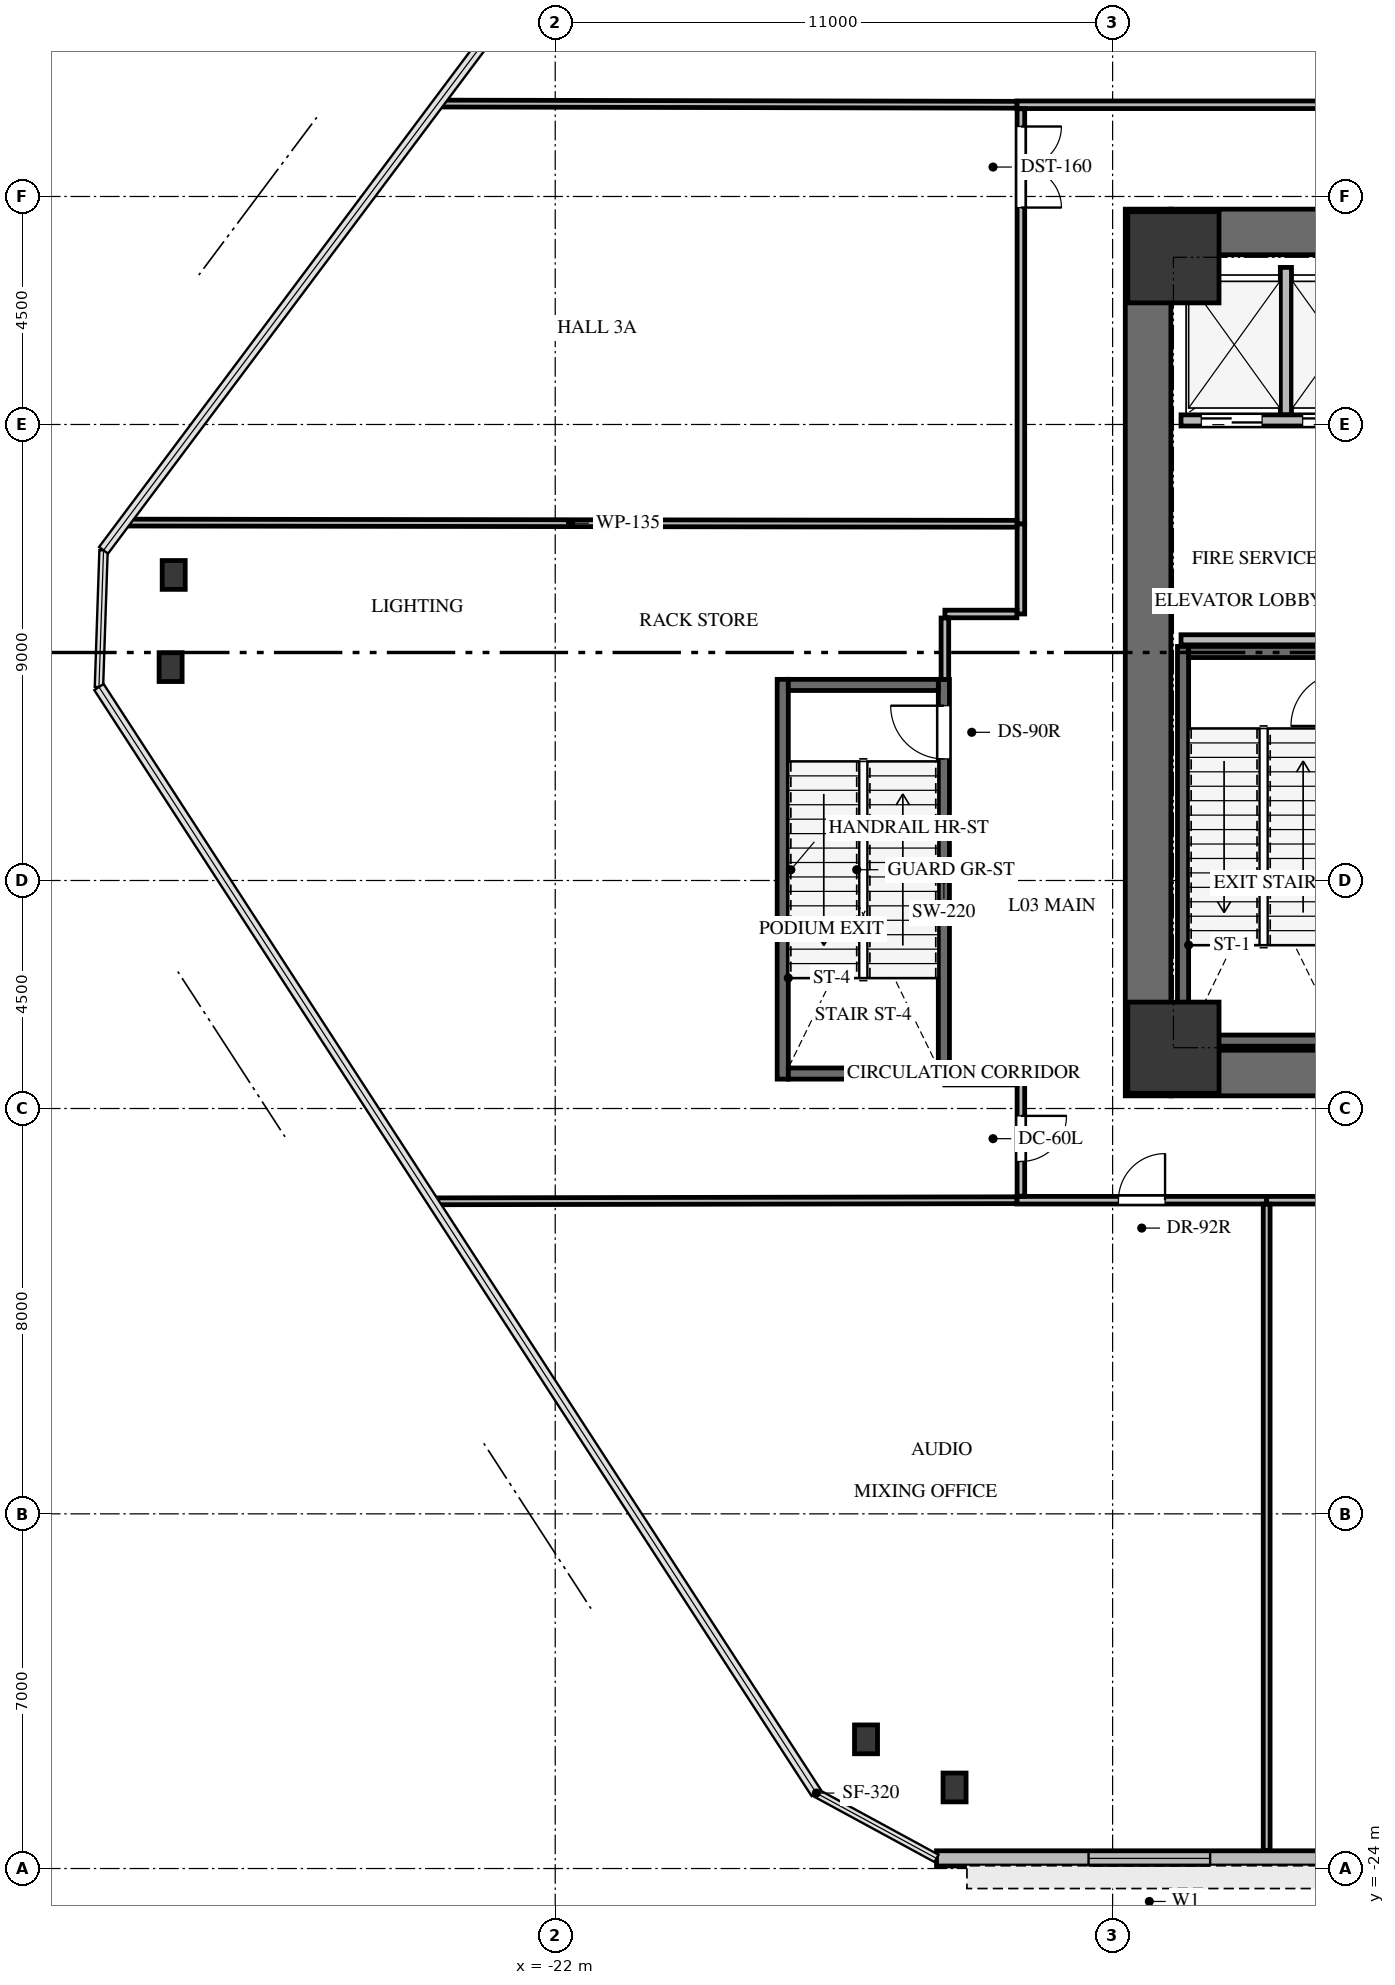
"""IFC4 building model, lengths in metres.
Left out: names, types, materials, properties, quantities, classifications, styles, units other than length and angle.
Written with IfcOpenShell. Run it as: python <this file> out.ifc"""

import sys

from ifc_helpers import new_model, si_unit, direction, frame, frame_2d, origin, origin_2d, place, context, subcontext, project, spatial, rectangle, i_section, extrude, source, transform, mapped, element, fill, save


model = new_model("IFC4")
c1 = context("Model", 3, precision=1e-05, world=origin(), true_north=direction((0.0, 1.0)))
c2 = subcontext(c1, "Body", "Model", "MODEL_VIEW")
j1 = project(units=[si_unit("LENGTHUNIT", "METRE"), si_unit("PLANEANGLEUNIT", "RADIAN")], contexts=[c1])
p1 = place(None, origin())
s1 = spatial("IfcSite", under=j1, at=p1, CompositionType="ELEMENT")
p2 = place(p1, origin())
s2 = spatial("IfcBuilding", under=s1, at=p2, CompositionType="ELEMENT")
p3 = place(p2, frame((0.0, 0.0, 15.6)))
s3 = spatial("IfcBuildingStorey", under=s2, at=p3, CompositionType="ELEMENT", Elevation=15.6)
p4 = place(p3, frame((-10.3, -8.75, 0.0), z_axis=(0.0, 0.0, 1.0), x_axis=(0.0, 1.0, 0.0)))
e1 = element("IfcWall", 1, at=p4, inside=s3, PredefinedType="SHEAR", context=c2, shape_type="SweptSolid", body=[
    extrude(rectangle(XDim=17.5, YDim=0.9, at=frame_2d((8.75, 0.0))), origin(), (0.0, 0.0, 1.0), 5.6),
])
p5 = place(p3, frame((-9.85, -8.3, 0.0), z_axis=(0.0, 0.0, 1.0), x_axis=(1.0, 0.0, 0.0)))
e2 = element("IfcWall", 2, at=p5, inside=s3, PredefinedType="SHEAR", context=c2, shape_type="SweptSolid", body=[
    extrude(rectangle(XDim=7.75, YDim=0.9, at=frame_2d((3.875, 0.0))), origin(), (0.0, 0.0, 1.0), 5.6),
])
p6 = place(p3, frame((-9.85, 8.3, 0.0), z_axis=(0.0, 0.0, 1.0), x_axis=(1.0, 0.0, 0.0)))
e3 = element("IfcWall", 3, at=p6, inside=s3, PredefinedType="SHEAR", context=c2, shape_type="SweptSolid", body=[
    extrude(rectangle(XDim=19.7, YDim=0.9, at=frame_2d((9.85, 0.0))), origin(), (0.0, 0.0, 1.0), 5.6),
])
p7 = place(p3, frame((-9.61, 0.12, -0.32), z_axis=(0.0, 0.0, 1.0), x_axis=(0.0, -1.0, 0.0)))
e4 = element("IfcWall", 4, at=p7, inside=s3, PredefinedType="SHEAR", context=c2, shape_type="SweptSolid", body=[
    extrude(rectangle(XDim=7.89, YDim=0.22, at=frame_2d((3.945, 0.0))), origin(), (0.0, 0.0, 1.0), 5.6),
])
for number, where, z_axis, x_axis in (
    (5, (-9.5, -7.66, -0.32), (0.0, 0.0, 1.0), (1.0, 0.0, 0.0)),
    (6, (-6.54, 0.01, -0.32), (0.0, 0.0, 1.0), (-1.0, 0.0, 0.0)),
):
    element("IfcWall", number, at=place(p3, frame(where, z_axis=z_axis, x_axis=x_axis)), inside=s3, PredefinedType="SHEAR", context=c2, shape_type="SweptSolid", body=[
        extrude(rectangle(XDim=2.96, YDim=0.22, at=frame_2d((1.48, 0.0))), origin(), (0.0, 0.0, 1.0), 5.6),
    ])
p8 = place(p3, frame((-14.33, -8.42, -0.32), z_axis=(0.0, 0.0, 1.0), x_axis=(0.0, 1.0, 0.0)))
e7 = element("IfcWall", 7, at=p8, inside=s3, PredefinedType="SHEAR", context=c2, shape_type="SweptSolid", body=[
    extrude(rectangle(XDim=7.89, YDim=0.22, at=frame_2d((3.945, 0.0))), origin(), (0.0, 0.0, 1.0), 5.6),
])
p9 = place(p8, frame((6.32, 0.0, 0.0)))
e8 = element("IfcOpeningElement", 8, at=p9, cuts=e7, PredefinedType="OPENING", context=c2, shape_type="SweptSolid", body=[
    extrude(rectangle(XDim=1.05, YDim=2.15, at=frame_2d((0.525, 1.075))), frame((0.0, 0.12, 0.0), z_axis=(0.0, -1.0, 0.0), x_axis=(1.0, 0.0, 0.0)), (0.0, 0.0, 1.0), 0.24),
])
p10 = place(p3, frame((-17.51, -0.53, -0.32), z_axis=(0.0, 0.0, 1.0), x_axis=(0.0, -1.0, 0.0)))
e9 = element("IfcWall", 9, at=p10, inside=s3, PredefinedType="SHEAR", context=c2, shape_type="SweptSolid", body=[
    extrude(rectangle(XDim=7.89, YDim=0.22, at=frame_2d((3.945, 0.0))), origin(), (0.0, 0.0, 1.0), 5.6),
])
for number, where, z_axis, x_axis in (
    (10, (-17.4, -8.31, -0.32), (0.0, 0.0, 1.0), (1.0, 0.0, 0.0)),
    (11, (-14.44, -0.64, -0.32), (0.0, 0.0, 1.0), (-1.0, 0.0, 0.0)),
):
    element("IfcWall", number, at=place(p3, frame(where, z_axis=z_axis, x_axis=x_axis)), inside=s3, PredefinedType="SHEAR", context=c2, shape_type="SweptSolid", body=[
        extrude(rectangle(XDim=2.96, YDim=0.22, at=frame_2d((1.48, 0.0))), origin(), (0.0, 0.0, 1.0), 5.6),
    ])
m1 = source(origin(), c2, "Body", "SweptSolid", [
    extrude(rectangle(XDim=1.8, YDim=1.8, at=origin_2d()), origin(), (0.0, 0.0, 1.0), 5.6),
])
for number, where, z_axis, x_axis in (
    (12, (-9.8, -7.8, -0.32), (0.0, 0.0, 1.0), (1.0, 0.0, 0.0)),
    (13, (-9.8, 7.8, -0.32), (0.0, 0.0, 1.0), (1.0, 0.0, 0.0)),
):
    element("IfcColumn", number, at=place(p3, frame(where, z_axis=z_axis, x_axis=x_axis)), inside=s3, PredefinedType="COLUMN", context=c2, shape_type="MappedRepresentation", body=[
        mapped(m1, transform((0.0, 0.0, 0.0), x_axis=(1.0, 0.0, 0.0), y_axis=(0.0, 1.0, 0.0), z_axis=(0.0, 0.0, 1.0), scale=1.0)),
    ])
m2 = source(origin(), c2, "Body", "SweptSolid", [
    extrude(i_section(OverallWidth=0.454, OverallDepth=0.569, WebThickness=0.078, FlangeThickness=0.125, FilletRadius=0.031, at=origin_2d()), origin(), (0.0, 0.0, 1.0), 5.6),
])
for number, where, z_axis, x_axis in (
    (14, (-15.866, -21.451, -0.32), (0.0, 0.0, 1.0), (1.0, 0.0, 0.0)),
    (15, (-29.591, -0.289, -0.32), (0.0, 0.0, 1.0), (1.0, 0.0, 0.0)),
    (16, (-29.529, 1.531, -0.32), (0.0, 0.0, 1.0), (1.0, 0.0, 0.0)),
    (17, (-14.119, -22.4, -0.32), (0.0, 0.0, 1.0), (1.0, 0.0, 0.0)),
):
    element("IfcColumn", number, at=place(p3, frame(where, z_axis=z_axis, x_axis=x_axis)), inside=s3, PredefinedType="COLUMN", context=c2, shape_type="MappedRepresentation", body=[
        mapped(m2, transform((0.0, 0.0, 0.0), x_axis=(1.0, 0.0, 0.0), y_axis=(0.0, 1.0, 0.0), z_axis=(0.0, 0.0, 1.0), scale=1.0)),
    ])
p11 = place(p3, frame((13.103, -23.8, 0.0), z_axis=(0.0, 0.0, 1.0), x_axis=(-1.0, 0.0, 0.0)))
e18 = element("IfcWall", 18, at=p11, inside=s3, PredefinedType="SOLIDWALL", context=c2, shape_type="SweptSolid", body=[
    extrude(rectangle(XDim=27.578, YDim=0.3, at=frame_2d((13.789, 0.0))), origin(), (0.0, 0.0, 1.0), 5.28),
])
p12 = place(p11, frame((3.0, 0.0, 1.0)))
e19 = element("IfcOpeningElement", 19, at=p12, cuts=e18, PredefinedType="OPENING", context=c2, shape_type="SweptSolid", body=[
    extrude(rectangle(XDim=2.4, YDim=2.1, at=frame_2d((1.2, 1.05))), frame((0.0, 0.16, 0.0), z_axis=(0.0, -1.0, 0.0), x_axis=(1.0, 0.0, 0.0)), (0.0, 0.0, 1.0), 0.32),
])
p13 = place(p11, frame((22.178, 0.0, 1.0)))
e20 = element("IfcOpeningElement", 20, at=p13, cuts=e18, PredefinedType="OPENING", context=c2, shape_type="SweptSolid", body=[
    extrude(rectangle(XDim=2.4, YDim=2.1, at=frame_2d((1.2, 1.05))), frame((0.0, 0.16, 0.0), z_axis=(0.0, -1.0, 0.0), x_axis=(1.0, 0.0, 0.0)), (0.0, 0.0, 1.0), 0.32),
])
p14 = place(p3, frame((-9.65, 4.58, 0.0), z_axis=(0.0, 0.0, 1.0), x_axis=(1.0, 0.0, 0.0)))
e21 = element("IfcWall", 21, at=p14, inside=s3, PredefinedType="SOLIDWALL", context=c2, shape_type="SweptSolid", body=[
    extrude(rectangle(XDim=4.175, YDim=0.22, at=frame_2d((2.087, 0.0))), origin(), (0.0, 0.0, 1.0), 5.265),
])
p15 = place(p14, frame((0.4, 0.0, 0.0)))
e22 = element("IfcOpeningElement", 22, at=p15, cuts=e21, PredefinedType="OPENING", context=c2, shape_type="SweptSolid", body=[
    extrude(rectangle(XDim=1.2, YDim=2.15, at=frame_2d((0.6, 1.075))), frame((0.0, 0.12, 0.0), z_axis=(0.0, -1.0, 0.0), x_axis=(1.0, 0.0, 0.0)), (0.0, 0.0, 1.0), 0.24),
])
p16 = place(p14, frame((2.4, 0.0, 0.0)))
e23 = element("IfcOpeningElement", 23, at=p16, cuts=e21, PredefinedType="OPENING", context=c2, shape_type="SweptSolid", body=[
    extrude(rectangle(XDim=1.2, YDim=2.15, at=frame_2d((0.6, 1.075))), frame((0.0, 0.12, 0.0), z_axis=(0.0, -1.0, 0.0), x_axis=(1.0, 0.0, 0.0)), (0.0, 0.0, 1.0), 0.24),
])
p17 = place(p3, frame((-7.58, 4.694, 0.0), z_axis=(0.0, 0.0, 1.0), x_axis=(0.0, 1.0, 0.0)))
e24 = element("IfcWall", 24, at=p17, inside=s3, PredefinedType="SOLIDWALL", context=c2, shape_type="SweptSolid", body=[
    extrude(rectangle(XDim=2.906, YDim=0.22, at=frame_2d((1.453, 0.0))), origin(), (0.0, 0.0, 1.0), 5.265),
])
p18 = place(p3, frame((-9.65, 0.25, 0.0), z_axis=(0.0, 0.0, 1.0), x_axis=(1.0, 0.0, 0.0)))
e25 = element("IfcWall", 25, at=p18, inside=s3, PredefinedType="SOLIDWALL", context=c2, shape_type="SweptSolid", body=[
    extrude(rectangle(XDim=4.27, YDim=0.2, at=frame_2d((2.135, 0.0))), origin(), (0.0, 0.0, 1.0), 5.265),
])
p19 = place(p3, frame((-3.96, 10.81, 0.0), z_axis=(0.0, 0.0, 1.0), x_axis=(-1.0, 0.0, 0.0)))
e26 = element("IfcWall", 26, at=p19, inside=s3, PredefinedType="PARTITIONING", context=c2, shape_type="SweptSolid", body=[
    extrude(rectangle(XDim=8.93, YDim=0.15, at=frame_2d((4.465, 0.0))), origin(), (0.0, 0.0, 1.0), 4.284),
])
p20 = place(p19, frame((0.35, 0.0, 0.0)))
e27 = element("IfcOpeningElement", 27, at=p20, cuts=e26, PredefinedType="OPENING", context=c2, shape_type="SweptSolid", body=[
    extrude(rectangle(XDim=1.6, YDim=2.15, at=frame_2d((0.8, 1.075))), frame((0.0, 0.085, 0.0), z_axis=(0.0, -1.0, 0.0), x_axis=(1.0, 0.0, 0.0)), (0.0, 0.0, 1.0), 0.17),
])
p21 = place(p3, frame((-12.89, -10.81, 0.0), z_axis=(0.0, 0.0, 1.0), x_axis=(1.0, 0.0, 0.0)))
e28 = element("IfcWall", 28, at=p21, inside=s3, PredefinedType="PARTITIONING", context=c2, shape_type="SweptSolid", body=[
    extrude(rectangle(XDim=4.93, YDim=0.15, at=frame_2d((2.465, 0.0))), origin(), (0.0, 0.0, 1.0), 4.284),
])
p22 = place(p21, frame((2.005, 0.0, 0.0)))
e29 = element("IfcOpeningElement", 29, at=p22, cuts=e28, PredefinedType="OPENING", context=c2, shape_type="SweptSolid", body=[
    extrude(rectangle(XDim=0.92, YDim=2.1, at=frame_2d((0.46, 1.05))), frame((0.0, 0.085, 0.0), z_axis=(0.0, -1.0, 0.0), x_axis=(1.0, 0.0, 0.0)), (0.0, 0.0, 1.0), 0.17),
])
p23 = place(p3, frame((-7.96, -10.81, 0.0), z_axis=(0.0, 0.0, 1.0), x_axis=(1.0, 0.0, 0.0)))
e30 = element("IfcWall", 30, at=p23, inside=s3, PredefinedType="PARTITIONING", context=c2, shape_type="SweptSolid", body=[
    extrude(rectangle(XDim=14.0, YDim=0.15, at=frame_2d((7.0, 0.0))), origin(), (0.0, 0.0, 1.0), 4.284),
])
p24 = place(p23, frame((6.525, 0.0, 0.0)))
e31 = element("IfcOpeningElement", 31, at=p24, cuts=e30, PredefinedType="OPENING", context=c2, shape_type="SweptSolid", body=[
    extrude(rectangle(XDim=0.95, YDim=2.1, at=frame_2d((0.475, 1.05))), frame((0.0, 0.085, 0.0), z_axis=(0.0, -1.0, 0.0), x_axis=(1.0, 0.0, 0.0)), (0.0, 0.0, 1.0), 0.17),
])
p25 = place(p3, frame((-12.81, -8.46, 0.0), z_axis=(0.0, 0.0, 1.0), x_axis=(0.0, -1.0, 0.0)))
e32 = element("IfcWall", 32, at=p25, inside=s3, PredefinedType="PARTITIONING", context=c2, shape_type="SweptSolid", body=[
    extrude(rectangle(XDim=2.271, YDim=0.15, at=frame_2d((1.135, 0.0))), origin(), (0.0, 0.0, 1.0), 5.265),
])
p26 = place(p25, frame((0.686, 0.0, 0.0)))
e33 = element("IfcOpeningElement", 33, at=p26, cuts=e32, PredefinedType="OPENING", context=c2, shape_type="SweptSolid", body=[
    extrude(rectangle(XDim=0.9, YDim=2.05, at=frame_2d((0.45, 1.025))), frame((0.0, 0.085, 0.0), z_axis=(0.0, -1.0, 0.0), x_axis=(1.0, 0.0, 0.0)), (0.0, 0.0, 1.0), 0.17),
])
p27 = place(p3, frame((-12.81, 2.54, 0.0), z_axis=(0.0, 0.0, 1.0), x_axis=(0.0, -1.0, 0.0)))
e34 = element("IfcWall", 34, at=p27, inside=s3, PredefinedType="PARTITIONING", context=c2, shape_type="SweptSolid", body=[
    extrude(rectangle(XDim=1.78, YDim=0.15, at=frame_2d((0.89, 0.0))), origin(), (0.0, 0.0, 1.0), 4.284),
])
for number, where, z_axis, x_axis in (
    (35, (-12.889, 0.76, 0.0), (0.0, 0.0, 1.0), (-1.0, 0.0, 0.0)),
    (36, (-14.31, -8.46, 0.0), (0.0, 0.0, 1.0), (1.0, 0.0, 0.0)),
):
    element("IfcWall", number, at=place(p3, frame(where, z_axis=z_axis, x_axis=x_axis)), inside=s3, PredefinedType="PARTITIONING", context=c2, shape_type="SweptSolid", body=[
        extrude(rectangle(XDim=1.421, YDim=0.15, at=frame_2d((0.71, 0.0))), origin(), (0.0, 0.0, 1.0), 5.265),
    ])
p28 = place(p3, frame((-14.31, 0.681, 0.0), z_axis=(0.0, 0.0, 1.0), x_axis=(0.0, -1.0, 0.0)))
e37 = element("IfcWall", 37, at=p28, inside=s3, PredefinedType="PARTITIONING", context=c2, shape_type="SweptSolid", body=[
    extrude(rectangle(XDim=1.211, YDim=0.15, at=frame_2d((0.605, 0.0))), origin(), (0.0, 0.0, 1.0), 5.265),
])
p29 = place(p3, frame((-12.81, 10.731, 0.0), z_axis=(0.0, 0.0, 1.0), x_axis=(0.0, -1.0, 0.0)))
e38 = element("IfcWall", 38, at=p29, inside=s3, PredefinedType="PARTITIONING", context=c2, shape_type="SweptSolid", body=[
    extrude(rectangle(XDim=8.191, YDim=0.15, at=frame_2d((4.095, 0.0))), origin(), (0.0, 0.0, 1.0), 4.284),
])
p30 = place(p29, frame((0.35, 0.0, 0.0)))
e39 = element("IfcOpeningElement", 39, at=p30, cuts=e38, PredefinedType="OPENING", context=c2, shape_type="SweptSolid", body=[
    extrude(rectangle(XDim=1.6, YDim=2.15, at=frame_2d((0.8, 1.075))), frame((0.0, 0.085, 0.0), z_axis=(0.0, -1.0, 0.0), x_axis=(1.0, 0.0, 0.0)), (0.0, 0.0, 1.0), 0.17),
])
p31 = place(p3, frame((-12.89, 10.81, 0.0), z_axis=(0.0, 0.0, 1.0), x_axis=(-0.999997852069, 0.002072645121, 0.0)))
e40 = element("IfcWall", 40, at=p31, inside=s3, PredefinedType="PARTITIONING", context=c2, shape_type="SweptSolid", body=[
    extrude(rectangle(XDim=11.426, YDim=0.135, at=frame_2d((5.713, 0.0))), origin(), (0.0, 0.0, 1.0), 4.574),
])
p32 = place(p3, frame((-7.96, -10.889, 0.0), z_axis=(0.0, 0.0, 1.0), x_axis=(0.0, -1.0, 0.0)))
e41 = element("IfcWall", 41, at=p32, inside=s3, PredefinedType="PARTITIONING", context=c2, shape_type="SweptSolid", body=[
    extrude(rectangle(XDim=12.756, YDim=0.135, at=frame_2d((6.378, 0.0))), origin(), (0.0, 0.0, 1.0), 4.284),
])
p33 = place(p3, frame((-24.422, -10.832, 0.0), z_axis=(0.0, 0.0, 1.0), x_axis=(0.999998264499, 0.001863061508, 0.0)))
e42 = element("IfcWall", 42, at=p33, inside=s3, PredefinedType="PARTITIONING", context=c2, shape_type="SweptSolid", body=[
    extrude(rectangle(XDim=11.532, YDim=0.135, at=frame_2d((5.766, 0.0))), origin(), (0.0, 0.0, 1.0), 4.574),
])
p34 = place(p3, frame((-30.505, 2.564, 0.0), z_axis=(0.0, 0.0, 1.0), x_axis=(0.999999077639, -0.001358204807, 0.0)))
e43 = element("IfcWall", 43, at=p34, inside=s3, PredefinedType="PARTITIONING", context=c2, shape_type="SweptSolid", body=[
    extrude(rectangle(XDim=17.616, YDim=0.135, at=frame_2d((8.808, 0.0))), origin(), (0.0, 0.0, 1.0), 4.097),
])
m3 = source(origin(), c2, "Body", "SweptSolid", [
    extrude(rectangle(XDim=2.4, YDim=2.1, at=frame_2d((1.2, 1.05))), frame((0.0, 0.03, 0.0), z_axis=(0.0, -1.0, 0.0), x_axis=(1.0, 0.0, 0.0)), (0.0, 0.0, 1.0), 0.06),
])
p35 = place(p13, origin())
e44 = element("IfcWindow", 44, at=p35, inside=s3, PartitioningType="SINGLE_PANEL", PredefinedType="WINDOW", context=c2, shape_type="MappedRepresentation", body=[
    mapped(m3, transform((0.0, 0.0, 0.0), x_axis=(1.0, 0.0, 0.0), y_axis=(0.0, 1.0, 0.0), z_axis=(0.0, 0.0, 1.0), scale=1.0)),
])
fill(e20, e44)
m4 = source(origin(), c2, "Body", "SweptSolid", [
    extrude(rectangle(XDim=1.05, YDim=2.15, at=frame_2d((0.525, 1.075))), frame((0.0, 0.025, 0.0), z_axis=(0.0, -1.0, 0.0), x_axis=(1.0, 0.0, 0.0)), (0.0, 0.0, 1.0), 0.05),
])
p36 = place(p9, origin())
e45 = element("IfcDoor", 45, at=p36, inside=s3, OperationType="SINGLE_SWING_RIGHT", PredefinedType="DOOR", context=c2, shape_type="MappedRepresentation", body=[
    mapped(m4, transform((0.0, 0.0, 0.0), x_axis=(1.0, 0.0, 0.0), y_axis=(0.0, 1.0, 0.0), z_axis=(0.0, 0.0, 1.0), scale=1.0)),
])
fill(e8, e45)
m5 = source(origin(), c2, "Body", "SweptSolid", [
    extrude(rectangle(XDim=1.2, YDim=2.15, at=frame_2d((0.6, 1.075))), frame((0.0, 0.025, 0.0), z_axis=(0.0, -1.0, 0.0), x_axis=(1.0, 0.0, 0.0)), (0.0, 0.0, 1.0), 0.05),
])
p37 = place(p15, origin())
e46 = element("IfcDoor", 46, at=p37, inside=s3, OperationType="DOUBLE_DOOR_SLIDING", PredefinedType="DOOR", context=c2, shape_type="MappedRepresentation", body=[
    mapped(m5, transform((0.0, 0.0, 0.0), x_axis=(1.0, 0.0, 0.0), y_axis=(0.0, 1.0, 0.0), z_axis=(0.0, 0.0, 1.0), scale=1.0)),
])
fill(e22, e46)
p38 = place(p16, origin())
e47 = element("IfcDoor", 47, at=p38, inside=s3, OperationType="DOUBLE_DOOR_SLIDING", PredefinedType="DOOR", context=c2, shape_type="MappedRepresentation", body=[
    mapped(m5, transform((0.0, 0.0, 0.0), x_axis=(1.0, 0.0, 0.0), y_axis=(0.0, 1.0, 0.0), z_axis=(0.0, 0.0, 1.0), scale=1.0)),
])
fill(e23, e47)
m6 = source(origin(), c2, "Body", "SweptSolid", [
    extrude(rectangle(XDim=0.92, YDim=2.1, at=frame_2d((0.46, 1.05))), frame((0.0, 0.025, 0.0), z_axis=(0.0, -1.0, 0.0), x_axis=(1.0, 0.0, 0.0)), (0.0, 0.0, 1.0), 0.05),
])
p39 = place(p22, origin())
e48 = element("IfcDoor", 48, at=p39, inside=s3, OperationType="SINGLE_SWING_RIGHT", PredefinedType="DOOR", context=c2, shape_type="MappedRepresentation", body=[
    mapped(m6, transform((0.0, 0.0, 0.0), x_axis=(1.0, 0.0, 0.0), y_axis=(0.0, 1.0, 0.0), z_axis=(0.0, 0.0, 1.0), scale=1.0)),
])
fill(e29, e48)
m7 = source(origin(), c2, "Body", "SweptSolid", [
    extrude(rectangle(XDim=0.9, YDim=2.05, at=frame_2d((0.45, 1.025))), frame((0.0, 0.025, 0.0), z_axis=(0.0, -1.0, 0.0), x_axis=(1.0, 0.0, 0.0)), (0.0, 0.0, 1.0), 0.05),
])
p40 = place(p26, origin())
e49 = element("IfcDoor", 49, at=p40, inside=s3, OperationType="SINGLE_SWING_LEFT", PredefinedType="DOOR", context=c2, shape_type="MappedRepresentation", body=[
    mapped(m7, transform((0.0, 0.0, 0.0), x_axis=(1.0, 0.0, 0.0), y_axis=(0.0, 1.0, 0.0), z_axis=(0.0, 0.0, 1.0), scale=1.0)),
])
fill(e33, e49)
m8 = source(origin(), c2, "Body", "SweptSolid", [
    extrude(rectangle(XDim=1.6, YDim=2.15, at=frame_2d((0.8, 1.075))), frame((0.0, 0.025, 0.0), z_axis=(0.0, -1.0, 0.0), x_axis=(1.0, 0.0, 0.0)), (0.0, 0.0, 1.0), 0.05),
])
p41 = place(p30, origin())
e50 = element("IfcDoor", 50, at=p41, inside=s3, OperationType="DOUBLE_DOOR_SINGLE_SWING", PredefinedType="DOOR", context=c2, shape_type="MappedRepresentation", body=[
    mapped(m8, transform((0.0, 0.0, 0.0), x_axis=(1.0, 0.0, 0.0), y_axis=(0.0, 1.0, 0.0), z_axis=(0.0, 0.0, 1.0), scale=1.0)),
])
fill(e39, e50)
save(model, sys.argv[1])
